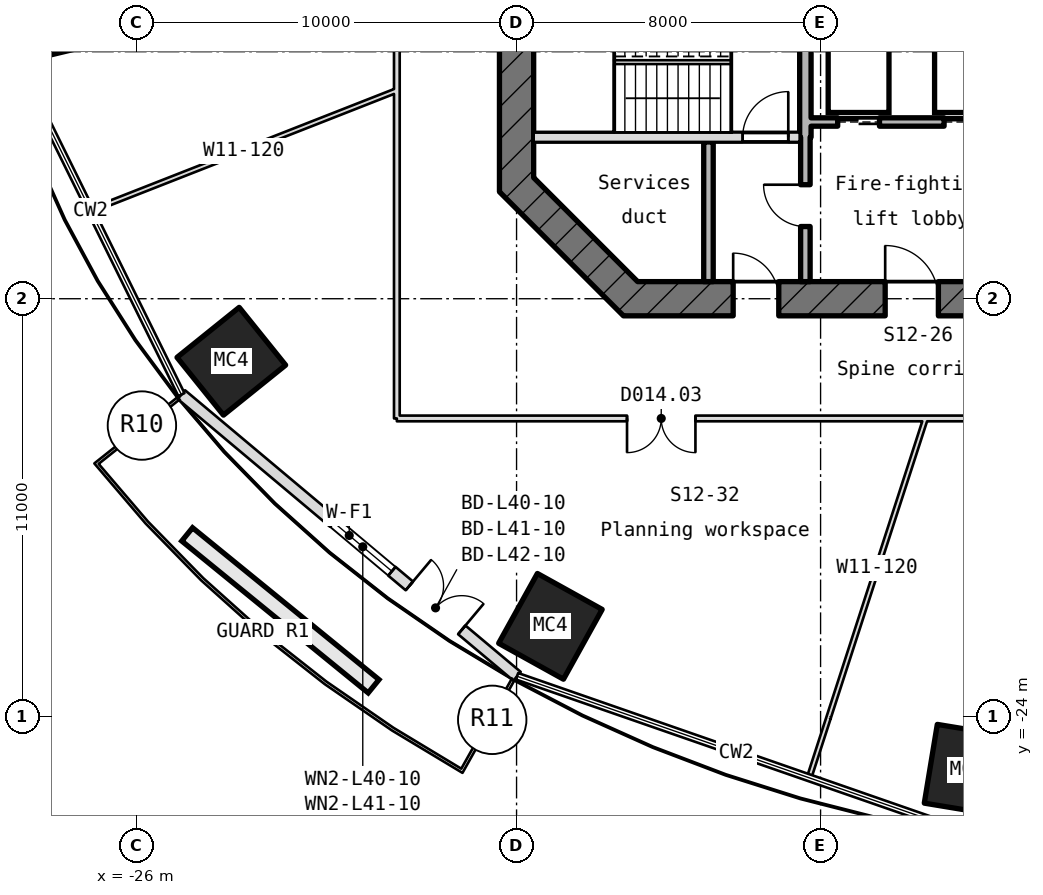
"""IFC4 building model, lengths in metres.
Left out: names, types, materials, properties, quantities, classifications, styles, units other than length and angle.
Written with IfcOpenShell. Run it as: python <this file> out.ifc"""

import sys

from ifc_helpers import new_model, si_unit, direction, frame, frame_2d, origin, origin_2d, place, context, subcontext, project, spatial, rectangle, hollow_rectangle, extrude, element, fill, save


model = new_model("IFC4")
c1 = context("Model", 3, precision=1e-05, world=origin(), true_north=direction((0.0, 1.0)))
c2 = subcontext(c1, "Body", "Model", "MODEL_VIEW")
j1 = project(units=[si_unit("LENGTHUNIT", "METRE"), si_unit("PLANEANGLEUNIT", "RADIAN")], contexts=[c1])
p1 = place(None, origin())
s1 = spatial("IfcSite", under=j1, at=p1, CompositionType="ELEMENT")
p2 = place(p1, origin())
s2 = spatial("IfcBuilding", under=s1, at=p2, CompositionType="ELEMENT")
p3 = place(p2, frame((0.0, 0.0, 185.95)))
s3 = spatial("IfcBuildingStorey", under=s2, at=p3, CompositionType="ELEMENT", Elevation=185.95)
for number, where, z_axis, x_axis in (
    (1, (-28.05, -5.532, -0.18), (0.0, 0.0, 1.0), (-0.233, 0.973, 0.0)),
    (2, (-23.506, -14.646, -0.18), (0.0, 0.0, 1.0), (-0.627, 0.779, 0.0)),
    (3, (-15.109, -21.62, -0.18), (0.0, 0.0, 1.0), (-0.874, 0.485, 0.0)),
    (4, (-4.138, -25.395, -0.18), (0.0, 0.0, 1.0), (-0.987, 0.163, 0.0)),
):
    element("IfcColumn", number, at=place(p3, frame(where, z_axis=z_axis, x_axis=x_axis)), inside=s3, PredefinedType="COLUMN", context=c2, shape_type="SweptSolid", body=[
        extrude(hollow_rectangle(XDim=1.95, YDim=2.1, WallThickness=0.075, at=origin_2d()), origin(), (0.0, 0.0, 1.0), 4.15),
    ])
p4 = place(p3, frame((-24.82, -15.523, 0.0), z_axis=(0.0, 0.0, 1.0), x_axis=(0.766082233378, -0.642742570321, 0.0)))
e5 = element("IfcWall", 5, at=p4, inside=s3, PredefinedType="SOLIDWALL", context=c2, shape_type="SweptSolid", body=[
    extrude(rectangle(XDim=11.53, YDim=0.3, at=frame_2d((5.765, 0.0))), origin(), (0.0, 0.0, 1.0), 3.97),
])
p5 = place(p4, frame((7.83, 0.0, 0.0)))
e6 = element("IfcOpeningElement", 6, at=p5, cuts=e5, PredefinedType="OPENING", context=c2, shape_type="SweptSolid", body=[
    extrude(rectangle(XDim=1.8, YDim=2.4, at=frame_2d((0.9, 1.2))), frame((0.0, 0.16, 0.0), z_axis=(0.0, -1.0, 0.0), x_axis=(1.0, 0.0, 0.0)), (0.0, 0.0, 1.0), 0.32),
])
p6 = place(p4, frame((5.23, 0.0, 0.9)))
e7 = element("IfcOpeningElement", 7, at=p6, cuts=e5, PredefinedType="OPENING", context=c2, shape_type="SweptSolid", body=[
    extrude(rectangle(XDim=2.0, YDim=1.5, at=frame_2d((1.0, 0.75))), frame((0.0, 0.16, 0.0), z_axis=(0.0, -1.0, 0.0), x_axis=(1.0, 0.0, 0.0)), (0.0, 0.0, 1.0), 0.32),
])
p7 = place(p3, frame((-16.0, 10.186, -0.18), z_axis=(0.0, 0.0, 1.0), x_axis=(0.0, -1.0, 0.0)))
e8 = element("IfcWall", 8, at=p7, inside=s3, PredefinedType="SHEAR", context=c2, shape_type="SweptSolid", body=[
    extrude(rectangle(XDim=20.373, YDim=0.9, at=frame_2d((10.186, 0.0))), origin(), (0.0, 0.0, 1.0), 4.15),
])
p8 = place(p7, frame((8.986, 0.0, 0.18)))
e9 = element("IfcOpeningElement", 9, at=p8, cuts=e8, PredefinedType="OPENING", context=c2, shape_type="SweptSolid", body=[
    extrude(rectangle(XDim=2.4, YDim=2.1, at=frame_2d((1.2, 1.05))), frame((0.0, 0.46, 0.0), z_axis=(0.0, -1.0, 0.0), x_axis=(1.0, 0.0, 0.0)), (0.0, 0.0, 1.0), 0.92),
])
p9 = place(p7, frame((5.586, 0.0, 0.18)))
e10 = element("IfcOpeningElement", 10, at=p9, cuts=e8, PredefinedType="OPENING", context=c2, shape_type="SweptSolid", body=[
    extrude(rectangle(XDim=1.2, YDim=2.1, at=frame_2d((0.6, 1.05))), frame((0.0, 0.46, 0.0), z_axis=(0.0, -1.0, 0.0), x_axis=(1.0, 0.0, 0.0)), (0.0, 0.0, 1.0), 0.92),
])
p10 = place(p3, frame((-16.132, -9.868, -0.18), z_axis=(0.0, 0.0, 1.0), x_axis=(0.707106781187, -0.707106781187, 0.0)))
e11 = element("IfcWall", 11, at=p10, inside=s3, PredefinedType="SHEAR", context=c2, shape_type="SweptSolid", body=[
    extrude(rectangle(XDim=4.615, YDim=0.9, at=frame_2d((2.308, 0.0))), origin(), (0.0, 0.0, 1.0), 4.15),
])
p11 = place(p3, frame((-13.186, -13.0, -0.18), z_axis=(0.0, 0.0, 1.0), x_axis=(1.0, 0.0, 0.0)))
e12 = element("IfcWall", 12, at=p11, inside=s3, PredefinedType="SHEAR", context=c2, shape_type="SweptSolid", body=[
    extrude(rectangle(XDim=26.373, YDim=0.9, at=frame_2d((13.186, 0.0))), origin(), (0.0, 0.0, 1.0), 4.15),
])
p12 = place(p11, frame((2.886, 0.0, 0.18)))
e13 = element("IfcOpeningElement", 13, at=p12, cuts=e12, PredefinedType="OPENING", context=c2, shape_type="SweptSolid", body=[
    extrude(rectangle(XDim=1.2, YDim=2.1, at=frame_2d((0.6, 1.05))), frame((0.0, 0.46, 0.0), z_axis=(0.0, -1.0, 0.0), x_axis=(1.0, 0.0, 0.0)), (0.0, 0.0, 1.0), 0.92),
])
p13 = place(p11, frame((6.886, 0.0, 0.18)))
e14 = element("IfcOpeningElement", 14, at=p13, cuts=e12, PredefinedType="OPENING", context=c2, shape_type="SweptSolid", body=[
    extrude(rectangle(XDim=1.4, YDim=2.1, at=frame_2d((0.7, 1.05))), frame((0.0, 0.46, 0.0), z_axis=(0.0, -1.0, 0.0), x_axis=(1.0, 0.0, 0.0)), (0.0, 0.0, 1.0), 0.92),
])
p14 = place(p11, frame((15.486, 0.0, 0.18)))
e15 = element("IfcOpeningElement", 15, at=p14, cuts=e12, PredefinedType="OPENING", context=c2, shape_type="SweptSolid", body=[
    extrude(rectangle(XDim=1.4, YDim=2.1, at=frame_2d((0.7, 1.05))), frame((0.0, 0.46, 0.0), z_axis=(0.0, -1.0, 0.0), x_axis=(1.0, 0.0, 0.0)), (0.0, 0.0, 1.0), 0.92),
])
p15 = place(p3, frame((-15.55, -8.75, -0.18), z_axis=(0.0, 0.0, 1.0), x_axis=(1.0, 0.0, 0.0)))
e16 = element("IfcWall", 16, at=p15, inside=s3, PredefinedType="SHEAR", context=c2, shape_type="SweptSolid", body=[
    extrude(rectangle(XDim=7.0, YDim=0.25, at=frame_2d((3.5, 0.0))), origin(), (0.0, 0.0, 1.0), 4.15),
])
p16 = place(p15, frame((5.5, 0.0, 0.18)))
e17 = element("IfcOpeningElement", 17, at=p16, cuts=e16, PredefinedType="OPENING", context=c2, shape_type="SweptSolid", body=[
    extrude(rectangle(XDim=1.2, YDim=2.1, at=frame_2d((0.6, 1.05))), frame((0.0, 0.135, 0.0), z_axis=(0.0, -1.0, 0.0), x_axis=(1.0, 0.0, 0.0)), (0.0, 0.0, 1.0), 0.27),
])
p17 = place(p3, frame((-8.25, -8.35, 0.0), z_axis=(0.0, 0.0, 1.0), x_axis=(1.0, 0.0, 0.0)))
e18 = element("IfcWall", 18, at=p17, inside=s3, PredefinedType="STANDARD", context=c2, shape_type="SweptSolid", body=[
    extrude(rectangle(XDim=5.34, YDim=0.22, at=frame_2d((2.67, 0.0))), origin(), (0.0, 0.0, 1.0), 3.97),
])
p18 = place(p17, frame((0.7, 0.0, 0.0)))
e19 = element("IfcOpeningElement", 19, at=p18, cuts=e18, PredefinedType="OPENING", context=c2, shape_type="SweptSolid", body=[
    extrude(rectangle(XDim=1.1, YDim=2.1, at=frame_2d((0.55, 1.05))), frame((0.0, 0.12, 0.0), z_axis=(0.0, -1.0, 0.0), x_axis=(1.0, 0.0, 0.0)), (0.0, 0.0, 1.0), 0.24),
])
p19 = place(p17, frame((3.5, 0.0, 0.0)))
e20 = element("IfcOpeningElement", 20, at=p19, cuts=e18, PredefinedType="OPENING", context=c2, shape_type="SweptSolid", body=[
    extrude(rectangle(XDim=1.1, YDim=2.1, at=frame_2d((0.55, 1.05))), frame((0.0, 0.12, 0.0), z_axis=(0.0, -1.0, 0.0), x_axis=(1.0, 0.0, 0.0)), (0.0, 0.0, 1.0), 0.24),
])
p20 = place(p3, frame((-10.95, -12.55, 0.0), z_axis=(0.0, 0.0, 1.0), x_axis=(0.0, 1.0, 0.0)))
e21 = element("IfcWall", 21, at=p20, inside=s3, PredefinedType="STANDARD", context=c2, shape_type="SweptSolid", body=[
    extrude(rectangle(XDim=3.675, YDim=0.25, at=frame_2d((1.837, 0.0))), origin(), (0.0, 0.0, 1.0), 3.97),
])
p21 = place(p3, frame((-8.4, -12.55, 0.0), z_axis=(0.0, 0.0, 1.0), x_axis=(0.0, 1.0, 0.0)))
e22 = element("IfcWall", 22, at=p21, inside=s3, PredefinedType="STANDARD", context=c2, shape_type="SweptSolid", body=[
    extrude(rectangle(XDim=3.8, YDim=0.25, at=frame_2d((1.9, 0.0))), origin(), (0.0, 0.0, 1.0), 3.97),
])
p22 = place(p21, frame((1.45, 0.0, 0.0)))
e23 = element("IfcOpeningElement", 23, at=p22, cuts=e22, PredefinedType="OPENING", context=c2, shape_type="SweptSolid", body=[
    extrude(rectangle(XDim=1.1, YDim=2.1, at=frame_2d((0.55, 1.05))), frame((0.0, 0.135, 0.0), z_axis=(0.0, -1.0, 0.0), x_axis=(1.0, 0.0, 0.0)), (0.0, 0.0, 1.0), 0.27),
])
p23 = place(p3, frame((-8.4, -8.75, -0.18), z_axis=(0.0, 0.0, 1.0), x_axis=(0.0, 1.0, 0.0)))
e24 = element("IfcWall", 24, at=p23, inside=s3, PredefinedType="SHEAR", context=c2, shape_type="SweptSolid", body=[
    extrude(rectangle(XDim=6.25, YDim=0.3, at=frame_2d((3.125, 0.0))), origin(), (0.0, 0.0, 1.0), 4.15),
])
p24 = place(p3, frame((-19.15, -16.15, 0.0), z_axis=(0.0, 0.0, 1.0), x_axis=(0.0, 1.0, 0.0)))
e25 = element("IfcWall", 25, at=p24, inside=s3, PredefinedType="PARTITIONING", context=c2, shape_type="SweptSolid", body=[
    extrude(rectangle(XDim=31.004, YDim=0.15, at=frame_2d((15.502, 0.0))), origin(), (0.0, 0.0, 1.0), 3.97),
])
p25 = place(p24, frame((20.147, 0.0, 0.0)))
e26 = element("IfcOpeningElement", 26, at=p25, cuts=e25, PredefinedType="OPENING", context=c2, shape_type="SweptSolid", body=[
    extrude(rectangle(XDim=0.95, YDim=2.1, at=frame_2d((0.475, 1.05))), frame((0.0, 0.085, 0.0), z_axis=(0.0, -1.0, 0.0), x_axis=(1.0, 0.0, 0.0)), (0.0, 0.0, 1.0), 0.17),
])
p26 = place(p24, frame((15.745, 0.0, 0.0)))
e27 = element("IfcOpeningElement", 27, at=p26, cuts=e25, PredefinedType="OPENING", context=c2, shape_type="SweptSolid", body=[
    extrude(rectangle(XDim=0.95, YDim=2.1, at=frame_2d((0.475, 1.05))), frame((0.0, 0.085, 0.0), z_axis=(0.0, -1.0, 0.0), x_axis=(1.0, 0.0, 0.0)), (0.0, 0.0, 1.0), 0.17),
])
p27 = place(p24, frame((10.425, 0.0, 0.0)))
e28 = element("IfcOpeningElement", 28, at=p27, cuts=e25, PredefinedType="OPENING", context=c2, shape_type="SweptSolid", body=[
    extrude(rectangle(XDim=1.8, YDim=2.1, at=frame_2d((0.9, 1.05))), frame((0.0, 0.085, 0.0), z_axis=(0.0, -1.0, 0.0), x_axis=(1.0, 0.0, 0.0)), (0.0, 0.0, 1.0), 0.17),
])
p28 = place(p3, frame((-19.15, -7.518, 0.0), z_axis=(0.0, 0.0, 1.0), x_axis=(-0.930851190322, -0.365398496816, 0.0)))
e29 = element("IfcWall", 29, at=p28, inside=s3, PredefinedType="PARTITIONING", context=c2, shape_type="SweptSolid", body=[
    extrude(rectangle(XDim=8.658, YDim=0.12, at=frame_2d((4.329, 0.0))), origin(), (0.0, 0.0, 1.0), 3.97),
])
p29 = place(p3, frame((-5.237, -16.15, 0.0), z_axis=(0.0, 0.0, 1.0), x_axis=(-0.308416643719, -0.951251372602, 0.0)))
e30 = element("IfcWall", 30, at=p29, inside=s3, PredefinedType="PARTITIONING", context=c2, shape_type="SweptSolid", body=[
    extrude(rectangle(XDim=8.272, YDim=0.12, at=frame_2d((4.136, 0.0))), origin(), (0.0, 0.0, 1.0), 3.434),
])
p30 = place(p3, frame((-7.788, -24.019, 0.0), z_axis=(0.0, 0.0, 1.0), x_axis=(-0.308397263442, -0.951257655896, 0.0)))
e31 = element("IfcWall", 31, at=p30, inside=s3, PredefinedType="PARTITIONING", context=c2, shape_type="SweptSolid", body=[
    extrude(rectangle(XDim=1.667, YDim=0.12, at=frame_2d((0.833, 0.0))), origin(), (0.0, 0.0, 1.0), 3.97),
])
p31 = place(p3, frame((19.15, -16.15, 0.0), z_axis=(0.0, 0.0, 1.0), x_axis=(-1.0, 0.0, 0.0)))
e32 = element("IfcWall", 32, at=p31, inside=s3, PredefinedType="PARTITIONING", context=c2, shape_type="SweptSolid", body=[
    extrude(rectangle(XDim=38.3, YDim=0.15, at=frame_2d((19.15, 0.0))), origin(), (0.0, 0.0, 1.0), 3.97),
])
p32 = place(p31, frame((30.443, 0.0, 0.0)))
e33 = element("IfcOpeningElement", 33, at=p32, cuts=e32, PredefinedType="OPENING", context=c2, shape_type="SweptSolid", body=[
    extrude(rectangle(XDim=1.8, YDim=2.1, at=frame_2d((0.9, 1.05))), frame((0.0, 0.085, 0.0), z_axis=(0.0, -1.0, 0.0), x_axis=(1.0, 0.0, 0.0)), (0.0, 0.0, 1.0), 0.17),
])
p33 = place(p31, frame((11.293, 0.0, 0.0)))
e34 = element("IfcOpeningElement", 34, at=p33, cuts=e32, PredefinedType="OPENING", context=c2, shape_type="SweptSolid", body=[
    extrude(rectangle(XDim=1.8, YDim=2.1, at=frame_2d((0.9, 1.05))), frame((0.0, 0.085, 0.0), z_axis=(0.0, -1.0, 0.0), x_axis=(1.0, 0.0, 0.0)), (0.0, 0.0, 1.0), 0.17),
])
p34 = place(p5, origin())
e35 = element("IfcDoor", 35, at=p34, inside=s3, OperationType="SINGLE_SWING_LEFT", PredefinedType="DOOR", context=c2, shape_type="SweptSolid", body=[
    extrude(rectangle(XDim=1.8, YDim=2.4, at=frame_2d((0.9, 1.2))), frame((0.0, 0.025, 0.0), z_axis=(0.0, -1.0, 0.0), x_axis=(1.0, 0.0, 0.0)), (0.0, 0.0, 1.0), 0.05),
])
fill(e6, e35)
p35 = place(p6, origin())
e36 = element("IfcWindow", 36, at=p35, inside=s3, PartitioningType="SINGLE_PANEL", PredefinedType="WINDOW", context=c2, shape_type="SweptSolid", body=[
    extrude(rectangle(XDim=2.0, YDim=1.5, at=frame_2d((1.0, 0.75))), frame((0.0, 0.03, 0.0), z_axis=(0.0, -1.0, 0.0), x_axis=(1.0, 0.0, 0.0)), (0.0, 0.0, 1.0), 0.06),
])
fill(e7, e36)
p36 = place(p18, origin())
e37 = element("IfcDoor", 37, at=p36, inside=s3, OperationType="DOUBLE_DOOR_SLIDING", PredefinedType="DOOR", context=c2, shape_type="SweptSolid", body=[
    extrude(rectangle(XDim=1.1, YDim=2.1, at=frame_2d((0.55, 1.05))), frame((0.0, 0.025, 0.0), z_axis=(0.0, -1.0, 0.0), x_axis=(1.0, 0.0, 0.0)), (0.0, 0.0, 1.0), 0.05),
])
fill(e19, e37)
p37 = place(p19, origin())
e38 = element("IfcDoor", 38, at=p37, inside=s3, OperationType="DOUBLE_DOOR_SLIDING", PredefinedType="DOOR", context=c2, shape_type="SweptSolid", body=[
    extrude(rectangle(XDim=1.1, YDim=2.1, at=frame_2d((0.55, 1.05))), frame((0.0, 0.025, 0.0), z_axis=(0.0, -1.0, 0.0), x_axis=(1.0, 0.0, 0.0)), (0.0, 0.0, 1.0), 0.05),
])
fill(e20, e38)
p38 = place(p16, origin())
e39 = element("IfcDoor", 39, at=p38, inside=s3, OperationType="SINGLE_SWING_RIGHT", PredefinedType="DOOR", context=c2, shape_type="SweptSolid", body=[
    extrude(rectangle(XDim=1.2, YDim=2.1, at=frame_2d((0.6, 1.05))), frame((0.0, 0.025, 0.0), z_axis=(0.0, -1.0, 0.0), x_axis=(1.0, 0.0, 0.0)), (0.0, 0.0, 1.0), 0.05),
])
fill(e17, e39)
p39 = place(p22, origin())
e40 = element("IfcDoor", 40, at=p39, inside=s3, OperationType="SINGLE_SWING_RIGHT", PredefinedType="DOOR", context=c2, shape_type="SweptSolid", body=[
    extrude(rectangle(XDim=1.1, YDim=2.1, at=frame_2d((0.55, 1.05))), frame((0.0, 0.025, 0.0), z_axis=(0.0, -1.0, 0.0), x_axis=(1.0, 0.0, 0.0)), (0.0, 0.0, 1.0), 0.05),
])
fill(e23, e40)
p40 = place(p12, origin())
e41 = element("IfcDoor", 41, at=p40, inside=s3, OperationType="SINGLE_SWING_RIGHT", PredefinedType="DOOR", context=c2, shape_type="SweptSolid", body=[
    extrude(rectangle(XDim=1.2, YDim=2.1, at=frame_2d((0.6, 1.05))), frame((0.0, 0.025, 0.0), z_axis=(0.0, -1.0, 0.0), x_axis=(1.0, 0.0, 0.0)), (0.0, 0.0, 1.0), 0.05),
])
fill(e13, e41)
p41 = place(p13, origin())
e42 = element("IfcDoor", 42, at=p41, inside=s3, OperationType="SINGLE_SWING_RIGHT", PredefinedType="DOOR", context=c2, shape_type="SweptSolid", body=[
    extrude(rectangle(XDim=1.4, YDim=2.1, at=frame_2d((0.7, 1.05))), frame((0.0, 0.025, 0.0), z_axis=(0.0, -1.0, 0.0), x_axis=(1.0, 0.0, 0.0)), (0.0, 0.0, 1.0), 0.05),
])
fill(e14, e42)
p42 = place(p32, origin())
e43 = element("IfcDoor", 43, at=p42, inside=s3, OperationType="DOUBLE_DOOR_SINGLE_SWING", PredefinedType="DOOR", context=c2, shape_type="SweptSolid", body=[
    extrude(rectangle(XDim=1.8, YDim=2.1, at=frame_2d((0.9, 1.05))), frame((0.0, 0.025, 0.0), z_axis=(0.0, -1.0, 0.0), x_axis=(1.0, 0.0, 0.0)), (0.0, 0.0, 1.0), 0.05),
])
fill(e33, e43)
save(model, sys.argv[1])
